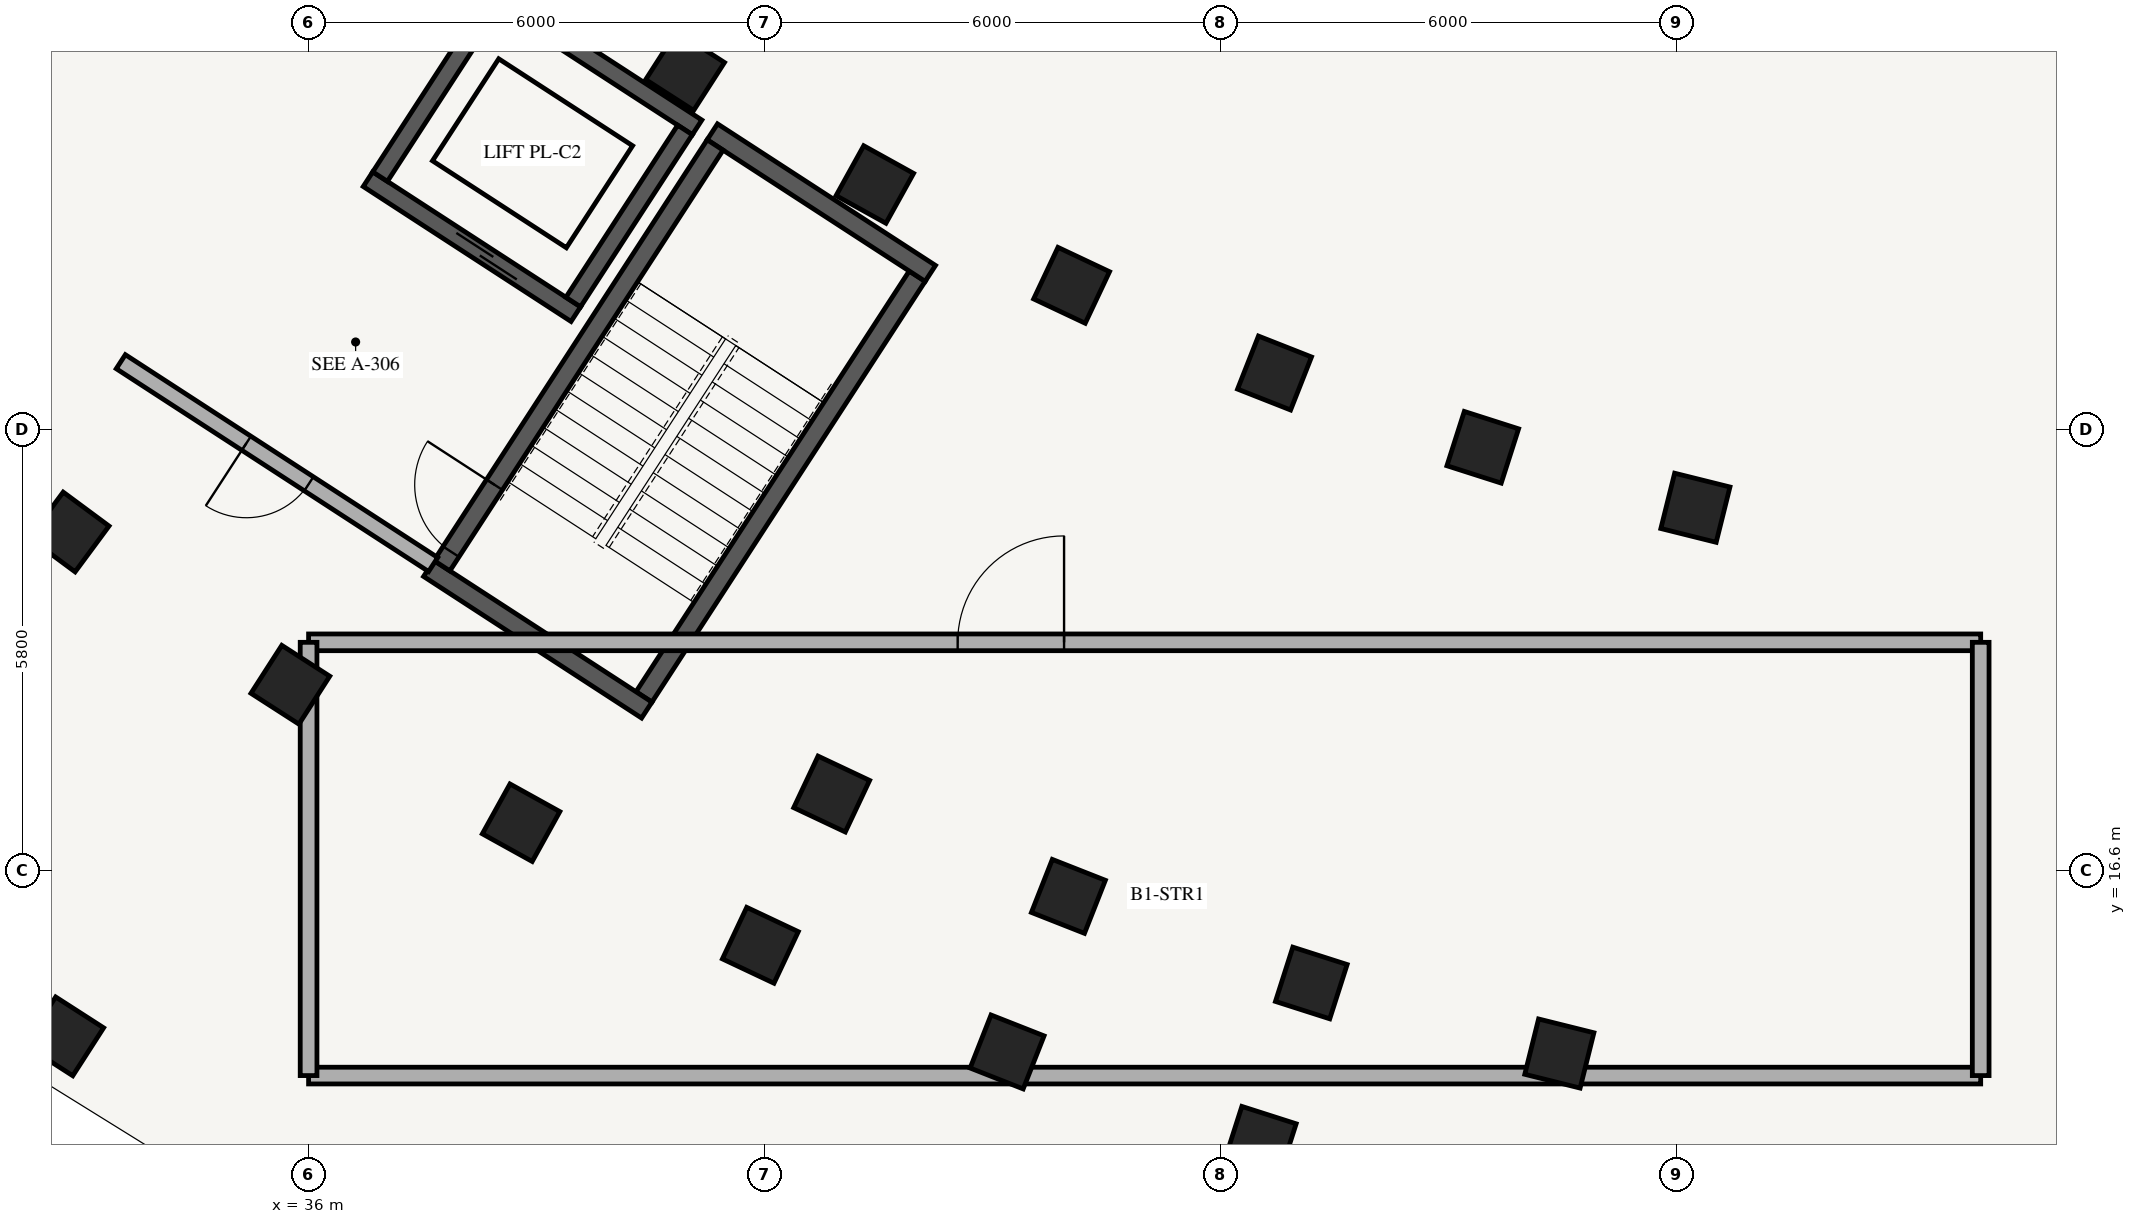
"""IFC4 building model, lengths in metres.
Left out: names, types, materials, properties, quantities, classifications, styles, units other than length and angle.
Written with IfcOpenShell. Run it as: python <this file> out.ifc"""

import sys

from ifc_helpers import new_model, si_unit, direction, frame, frame_2d, origin, origin_2d, place, context, subcontext, project, spatial, rectangle, extrude, element, fill, save


model = new_model("IFC4")
c1 = context("Model", 3, precision=1e-05, world=origin(), true_north=direction((0.0, 1.0)))
c2 = subcontext(c1, "Body", "Model", "MODEL_VIEW")
j1 = project(units=[si_unit("LENGTHUNIT", "METRE"), si_unit("PLANEANGLEUNIT", "RADIAN")], contexts=[c1])
p1 = place(None, origin())
s1 = spatial("IfcSite", under=j1, at=p1, CompositionType="ELEMENT")
p2 = place(p1, origin())
s2 = spatial("IfcBuilding", under=s1, at=p2, CompositionType="ELEMENT")
p3 = place(p2, frame((0.0, 0.0, -4.2)))
s3 = spatial("IfcBuildingStorey", under=s2, at=p3, CompositionType="ELEMENT", Elevation=-4.2)
p4 = place(p3, frame((40.413, 18.882, 0.0), z_axis=(0.0, 0.0, 1.0), x_axis=(0.544629435258, 0.838676802022, 0.0)))
e1 = element("IfcWall", 1, at=p4, inside=s3, PredefinedType="SHEAR", context=c2, shape_type="SweptSolid", body=[
    extrude(rectangle(XDim=6.6, YDim=0.25, at=frame_2d((3.3, 0.0))), origin(), (0.0, 0.0, 1.0), 3.92),
])
p5 = place(p3, frame((44.18, 24.454, 0.0), z_axis=(0.0, 0.0, 1.0), x_axis=(-0.838699580527, 0.544594356953, 0.0)))
e2 = element("IfcWall", 2, at=p5, inside=s3, PredefinedType="SHEAR", context=c2, shape_type="SweptSolid", body=[
    extrude(rectangle(XDim=3.42, YDim=0.25, at=frame_2d((1.71, 0.0))), origin(), (0.0, 0.0, 1.0), 3.92),
])
p6 = place(p3, frame((40.449, 18.709, 0.0), z_axis=(0.0, 0.0, 1.0), x_axis=(-0.838678407117, 0.544626963559, 0.0)))
e3 = element("IfcWall", 3, at=p6, inside=s3, PredefinedType="SHEAR", context=c2, shape_type="SweptSolid", body=[
    extrude(rectangle(XDim=3.42, YDim=0.25, at=frame_2d((1.71, 0.0))), origin(), (0.0, 0.0, 1.0), 3.92),
])
p7 = place(p3, frame((37.754, 20.608, 0.0), z_axis=(0.0, 0.0, 1.0), x_axis=(0.544655453679, 0.838659905312, 0.0)))
e4 = element("IfcWall", 4, at=p7, inside=s3, PredefinedType="SHEAR", context=c2, shape_type="SweptSolid", body=[
    extrude(rectangle(XDim=6.6, YDim=0.25, at=frame_2d((3.3, 0.0))), origin(), (0.0, 0.0, 1.0), 3.92),
])
p8 = place(p7, frame((0.22, 0.0, 0.0)))
e5 = element("IfcOpeningElement", 5, at=p8, cuts=e4, PredefinedType="OPENING", context=c2, shape_type="SweptSolid", body=[
    extrude(rectangle(XDim=1.05, YDim=2.15, at=frame_2d((0.525, 1.075))), frame((0.0, 0.135, 0.0), z_axis=(0.0, -1.0, 0.0), x_axis=(1.0, 0.0, 0.0)), (0.0, 0.0, 1.0), 0.27),
])
p9 = place(p3, frame((39.516, 23.917, 0.0), z_axis=(0.0, 0.0, 1.0), x_axis=(-0.838660840752, 0.544654013286, 0.0)))
e6 = element("IfcWall", 6, at=p9, inside=s3, PredefinedType="SHEAR", context=c2, shape_type="SweptSolid", body=[
    extrude(rectangle(XDim=3.26, YDim=0.23, at=frame_2d((1.63, 0.0))), origin(), (0.0, 0.0, 1.0), 3.92),
])
p10 = place(p9, frame((0.9, 0.0, 0.0)))
e7 = element("IfcOpeningElement", 7, at=p10, cuts=e6, PredefinedType="OPENING", context=c2, shape_type="SweptSolid", body=[
    extrude(rectangle(XDim=1.0, YDim=2.15, at=frame_2d((0.5, 1.075))), frame((0.0, 0.125, 0.0), z_axis=(0.0, -1.0, 0.0), x_axis=(1.0, 0.0, 0.0)), (0.0, 0.0, 1.0), 0.25),
])
p11 = place(p3, frame((41.112, 26.375, 0.0), z_axis=(0.0, 0.0, 1.0), x_axis=(-0.838638623546, 0.544688221919, 0.0)))
e8 = element("IfcWall", 8, at=p11, inside=s3, PredefinedType="SHEAR", context=c2, shape_type="SweptSolid", body=[
    extrude(rectangle(XDim=3.26, YDim=0.23, at=frame_2d((1.63, 0.0))), origin(), (0.0, 0.0, 1.0), 3.92),
])
p12 = place(p3, frame((39.482, 24.077, 0.0), z_axis=(0.0, 0.0, 1.0), x_axis=(0.544686387605, 0.838639814913, 0.0)))
e9 = element("IfcWall", 9, at=p12, inside=s3, PredefinedType="SHEAR", context=c2, shape_type="SweptSolid", body=[
    extrude(rectangle(XDim=2.7, YDim=0.23, at=frame_2d((1.35, 0.0))), origin(), (0.0, 0.0, 1.0), 3.92),
])
p13 = place(p3, frame((36.941, 25.727, 0.0), z_axis=(0.0, 0.0, 1.0), x_axis=(0.544622789439, 0.838681117722, 0.0)))
e10 = element("IfcWall", 10, at=p13, inside=s3, PredefinedType="SHEAR", context=c2, shape_type="SweptSolid", body=[
    extrude(rectangle(XDim=2.7, YDim=0.23, at=frame_2d((1.35, 0.0))), origin(), (0.0, 0.0, 1.0), 3.92),
])
for number, where, z_axis, x_axis in (
    (11, (32.85, 21.052, 0.0), (0.0, 0.0, 1.0), (-0.595, -0.804, 0.0)),
    (12, (40.954, 27.116, 0.0), (0.0, 0.0, 1.0), (-0.541, -0.841, 0.0)),
    (13, (35.76, 19.042, 0.0), (0.0, 0.0, 1.0), (-0.541, -0.841, 0.0)),
    (14, (32.785, 14.416, 0.0), (0.0, 0.0, 1.0), (-0.541, -0.841, 0.0)),
    (15, (43.45, 25.623, 0.0), (0.0, 0.0, 1.0), (-0.485, -0.875, 0.0)),
    (16, (38.796, 17.227, 0.0), (0.0, 0.0, 1.0), (-0.485, -0.875, 0.0)),
    (17, (46.039, 24.297, 0.0), (0.0, 0.0, 1.0), (-0.427, -0.904, 0.0)),
    (18, (42.882, 17.604, 0.0), (0.0, 0.0, 1.0), (-0.427, -0.904, 0.0)),
    (19, (41.944, 15.614, 0.0), (0.0, 0.0, 1.0), (-0.427, -0.904, 0.0)),
    (20, (48.709, 23.143, 0.0), (0.0, 0.0, 1.0), (-0.367, -0.93, 0.0)),
    (21, (45.997, 16.258, 0.0), (0.0, 0.0, 1.0), (-0.367, -0.93, 0.0)),
    (22, (45.191, 14.211, 0.0), (0.0, 0.0, 1.0), (-0.367, -0.93, 0.0)),
    (23, (51.449, 22.166, 0.0), (0.0, 0.0, 1.0), (-0.305, -0.952, 0.0)),
    (24, (49.193, 15.118, 0.0), (0.0, 0.0, 1.0), (-0.305, -0.952, 0.0)),
    (25, (48.522, 13.023, 0.0), (0.0, 0.0, 1.0), (-0.305, -0.952, 0.0)),
    (26, (54.247, 21.37, 0.0), (0.0, 0.0, 1.0), (-0.242, -0.97, 0.0)),
    (27, (52.456, 14.19, 0.0), (0.0, 0.0, 1.0), (-0.242, -0.97, 0.0)),
):
    element("IfcColumn", number, at=place(p3, frame(where, z_axis=z_axis, x_axis=x_axis)), inside=s3, PredefinedType="COLUMN", context=c2, shape_type="SweptSolid", body=[
        extrude(rectangle(XDim=0.75, YDim=0.75, at=origin_2d()), origin(), (0.0, 0.0, 1.0), 3.92),
    ])
p14 = place(p3, frame((37.639, 20.623, 0.0), z_axis=(0.0, 0.0, 1.0), x_axis=(-0.838681446513, 0.544622283124, 0.0)))
e28 = element("IfcWall", 28, at=p14, inside=s3, PredefinedType="PARTITIONING", context=c2, shape_type="SweptSolid", body=[
    extrude(rectangle(XDim=4.9, YDim=0.22, at=frame_2d((2.45, 0.0))), origin(), (0.0, 0.0, 1.0), 3.18),
])
p15 = place(p14, frame((1.95, 0.0, 0.0)))
e29 = element("IfcOpeningElement", 29, at=p15, cuts=e28, PredefinedType="OPENING", context=c2, shape_type="SweptSolid", body=[
    extrude(rectangle(XDim=0.98, YDim=2.14, at=frame_2d((0.49, 1.07))), frame((0.0, 0.12, 0.0), z_axis=(0.0, -1.0, 0.0), x_axis=(1.0, 0.0, 0.0)), (0.0, 0.0, 1.0), 0.24),
])
p16 = place(p3, frame((36.0, 19.6, 0.0), z_axis=(0.0, 0.0, 1.0), x_axis=(1.0, 0.0, 0.0)))
e30 = element("IfcWall", 30, at=p16, inside=s3, PredefinedType="PARTITIONING", context=c2, shape_type="SweptSolid", body=[
    extrude(rectangle(XDim=22.0, YDim=0.22, at=frame_2d((11.0, 0.0))), origin(), (0.0, 0.0, 1.0), 2.85),
])
p17 = place(p16, frame((8.54, 0.0, 0.0)))
e31 = element("IfcOpeningElement", 31, at=p17, cuts=e30, PredefinedType="OPENING", context=c2, shape_type="SweptSolid", body=[
    extrude(rectangle(XDim=1.4, YDim=2.15, at=frame_2d((0.7, 1.075))), frame((0.0, 0.12, 0.0), z_axis=(0.0, -1.0, 0.0), x_axis=(1.0, 0.0, 0.0)), (0.0, 0.0, 1.0), 0.24),
])
p18 = place(p3, frame((36.0, 13.9, 0.0), z_axis=(0.0, 0.0, 1.0), x_axis=(1.0, 0.0, 0.0)))
e32 = element("IfcWall", 32, at=p18, inside=s3, PredefinedType="PARTITIONING", context=c2, shape_type="SweptSolid", body=[
    extrude(rectangle(XDim=22.0, YDim=0.22, at=frame_2d((11.0, 0.0))), origin(), (0.0, 0.0, 1.0), 2.85),
])
for number, where, z_axis, x_axis in (
    (33, (36.0, 13.9, 0.0), (0.0, 0.0, 1.0), (0.0, 1.0, 0.0)),
    (34, (58.0, 13.9, 0.0), (0.0, 0.0, 1.0), (0.0, 1.0, 0.0)),
):
    element("IfcWall", number, at=place(p3, frame(where, z_axis=z_axis, x_axis=x_axis)), inside=s3, PredefinedType="PARTITIONING", context=c2, shape_type="SweptSolid", body=[
        extrude(rectangle(XDim=5.7, YDim=0.22, at=frame_2d((2.85, 0.0))), origin(), (0.0, 0.0, 1.0), 2.85),
    ])
p19 = place(p8, origin())
e35 = element("IfcDoor", 35, at=p19, inside=s3, OperationType="SINGLE_SWING_RIGHT", PredefinedType="DOOR", context=c2, shape_type="SweptSolid", body=[
    extrude(rectangle(XDim=1.05, YDim=2.15, at=frame_2d((0.525, 1.075))), frame((0.0, 0.025, 0.0), z_axis=(0.0, -1.0, 0.0), x_axis=(1.0, 0.0, 0.0)), (0.0, 0.0, 1.0), 0.05),
])
fill(e5, e35)
p20 = place(p10, origin())
e36 = element("IfcDoor", 36, at=p20, inside=s3, OperationType="DOUBLE_DOOR_SLIDING", PredefinedType="DOOR", context=c2, shape_type="SweptSolid", body=[
    extrude(rectangle(XDim=1.0, YDim=2.15, at=frame_2d((0.5, 1.075))), frame((0.0, 0.025, 0.0), z_axis=(0.0, -1.0, 0.0), x_axis=(1.0, 0.0, 0.0)), (0.0, 0.0, 1.0), 0.05),
])
fill(e7, e36)
p21 = place(p15, origin())
e37 = element("IfcDoor", 37, at=p21, inside=s3, OperationType="SINGLE_SWING_RIGHT", PredefinedType="DOOR", context=c2, shape_type="SweptSolid", body=[
    extrude(rectangle(XDim=0.98, YDim=2.14, at=frame_2d((0.49, 1.07))), frame((0.0, 0.025, 0.0), z_axis=(0.0, -1.0, 0.0), x_axis=(1.0, 0.0, 0.0)), (0.0, 0.0, 1.0), 0.05),
])
fill(e29, e37)
p22 = place(p17, origin())
e38 = element("IfcDoor", 38, at=p22, inside=s3, OperationType="DOUBLE_DOOR_SINGLE_SWING", PredefinedType="DOOR", context=c2, shape_type="SweptSolid", body=[
    extrude(rectangle(XDim=1.4, YDim=2.15, at=frame_2d((0.7, 1.075))), frame((0.0, 0.025, 0.0), z_axis=(0.0, -1.0, 0.0), x_axis=(1.0, 0.0, 0.0)), (0.0, 0.0, 1.0), 0.05),
])
fill(e31, e38)
save(model, sys.argv[1])
